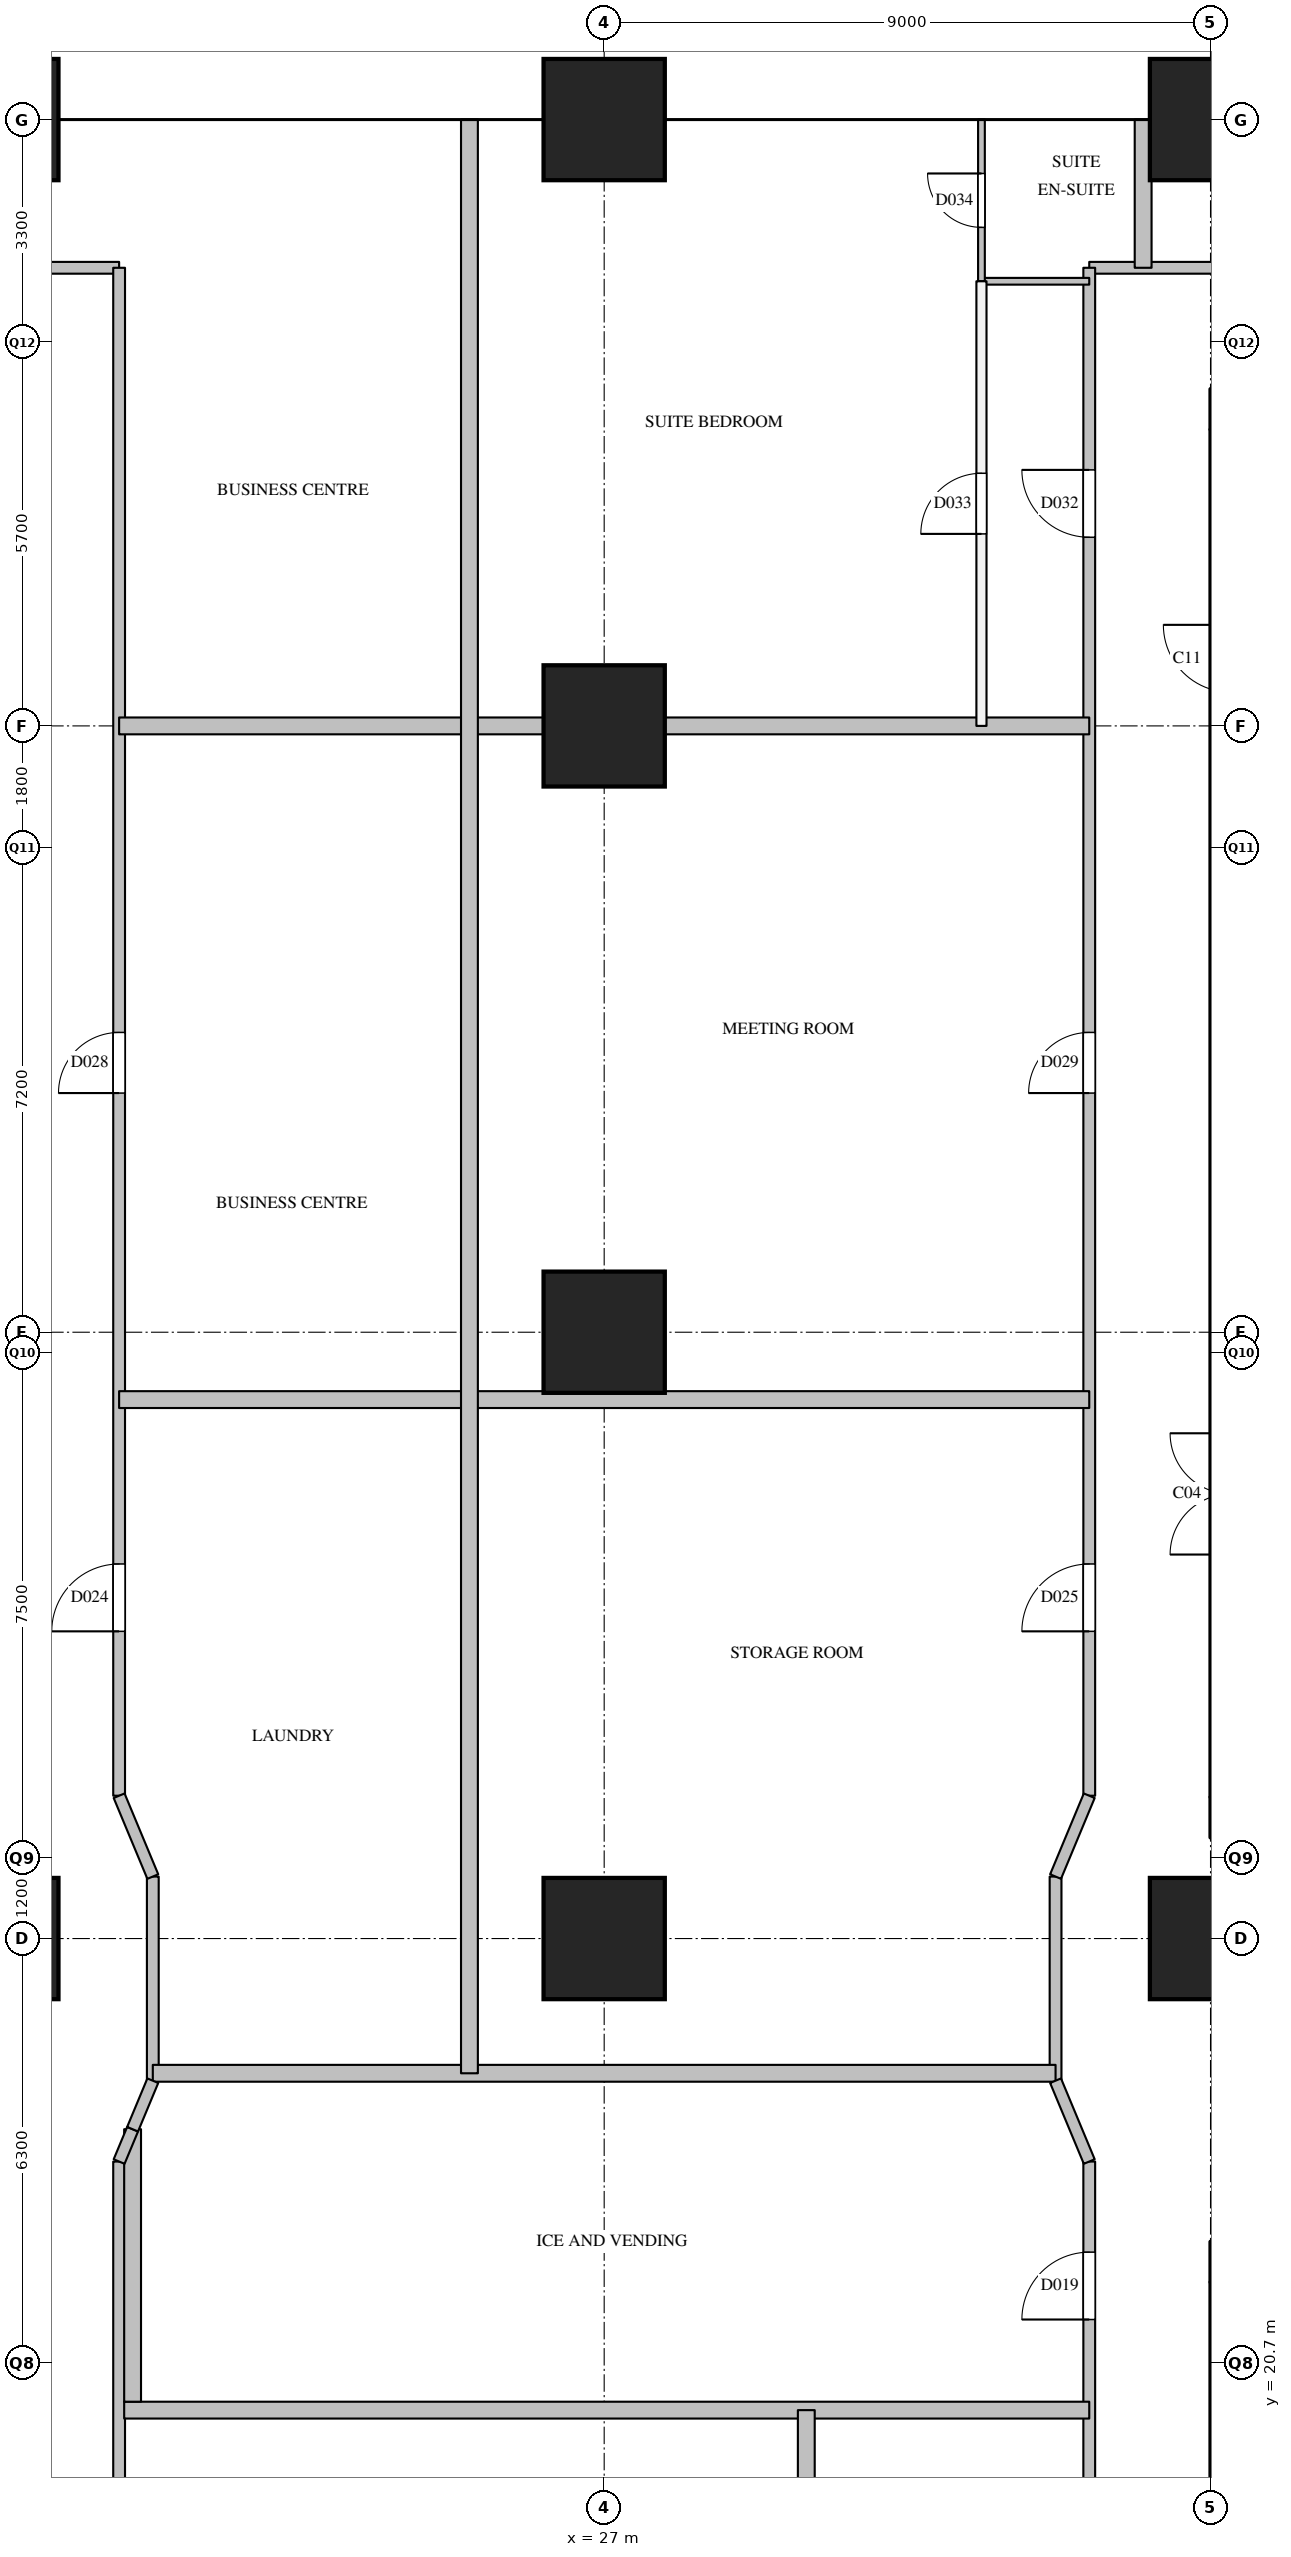
"""IFC4 building model, lengths in metres.
Left out: names, types, materials, properties, quantities, classifications, styles, units other than length and angle.
Written with IfcOpenShell. Run it as: python <this file> out.ifc"""

import sys

from ifc_helpers import new_model, si_unit, direction, frame, frame_2d, origin, origin_2d, place, context, subcontext, project, spatial, rectangle, extrude, element, fill, save


model = new_model("IFC4")
c1 = context("Model", 3, precision=1e-05, world=origin(), true_north=direction((0.0, 1.0)))
c2 = subcontext(c1, "Body", "Model", "MODEL_VIEW")
j1 = project(units=[si_unit("LENGTHUNIT", "METRE"), si_unit("PLANEANGLEUNIT", "RADIAN")], contexts=[c1])
p1 = place(None, origin())
s1 = spatial("IfcSite", under=j1, at=p1, CompositionType="ELEMENT")
p2 = place(p1, origin())
s2 = spatial("IfcBuilding", under=s1, at=p2, CompositionType="ELEMENT")
p3 = place(p2, frame((0.0, 0.0, 42.4)))
s3 = spatial("IfcBuildingStorey", under=s2, at=p3, CompositionType="ELEMENT", Elevation=42.4)
for number, where, z_axis, x_axis in (
    (1, (18.0, 27.0, 0.0), (0.0, 0.0, 1.0), (1.0, 0.0, 0.0)),
    (2, (18.0, 54.0, 0.0), (0.0, 0.0, 1.0), (1.0, 0.0, 0.0)),
    (3, (27.0, 27.0, 0.0), (0.0, 0.0, 1.0), (1.0, 0.0, 0.0)),
    (4, (27.0, 36.0, 0.0), (0.0, 0.0, 1.0), (1.0, 0.0, 0.0)),
    (5, (27.0, 45.0, 0.0), (0.0, 0.0, 1.0), (1.0, 0.0, 0.0)),
    (6, (27.0, 54.0, 0.0), (0.0, 0.0, 1.0), (1.0, 0.0, 0.0)),
    (7, (36.0, 27.0, 0.0), (0.0, 0.0, 1.0), (1.0, 0.0, 0.0)),
    (8, (36.0, 54.0, 0.0), (0.0, 0.0, 1.0), (1.0, 0.0, 0.0)),
):
    element("IfcColumn", number, at=place(p3, frame(where, z_axis=z_axis, x_axis=x_axis)), inside=s3, PredefinedType="COLUMN", context=c2, shape_type="SweptSolid", body=[
        extrude(rectangle(XDim=1.8, YDim=1.8, at=origin_2d()), origin(), (0.0, 0.0, 1.0), 3.8),
    ])
p4 = place(p3, frame((3.8, 51.8, 0.0), z_axis=(0.0, 0.0, 1.0), x_axis=(1.0, 0.0, 0.0)))
e9 = element("IfcWall", 9, at=p4, inside=s3, PredefinedType="PARTITIONING", context=c2, shape_type="SweptSolid", body=[
    extrude(rectangle(XDim=16.0, YDim=0.175, at=frame_2d((8.0, 0.0))), origin(), (0.0, 0.0, 1.0), 3.5),
])
p5 = place(p4, frame((10.65, 0.0, 0.0)))
e10 = element("IfcOpeningElement", 10, at=p5, cuts=e9, PredefinedType="OPENING", context=c2, shape_type="SweptSolid", body=[
    extrude(rectangle(XDim=0.9, YDim=2.1, at=frame_2d((0.45, 1.05))), frame((0.0, 0.097, 0.0), z_axis=(0.0, -1.0, 0.0), x_axis=(1.0, 0.0, 0.0)), (0.0, 0.0, 1.0), 0.195),
])
p6 = place(p3, frame((34.2, 51.8, 0.0), z_axis=(0.0, 0.0, 1.0), x_axis=(1.0, 0.0, 0.0)))
e11 = element("IfcWall", 11, at=p6, inside=s3, PredefinedType="PARTITIONING", context=c2, shape_type="SweptSolid", body=[
    extrude(rectangle(XDim=16.0, YDim=0.175, at=frame_2d((8.0, 0.0))), origin(), (0.0, 0.0, 1.0), 3.5),
])
p7 = place(p6, frame((5.35, 0.0, 0.0)))
e12 = element("IfcOpeningElement", 12, at=p7, cuts=e11, PredefinedType="OPENING", context=c2, shape_type="SweptSolid", body=[
    extrude(rectangle(XDim=0.9, YDim=2.1, at=frame_2d((0.45, 1.05))), frame((0.0, 0.097, 0.0), z_axis=(0.0, -1.0, 0.0), x_axis=(1.0, 0.0, 0.0)), (0.0, 0.0, 1.0), 0.195),
])
p8 = place(p3, frame((19.8, 7.2, 0.0), z_axis=(0.0, 0.0, 1.0), x_axis=(0.0, 1.0, 0.0)))
e13 = element("IfcWall", 13, at=p8, inside=s3, PredefinedType="PARTITIONING", context=c2, shape_type="SweptSolid", body=[
    extrude(rectangle(XDim=16.49, YDim=0.175, at=frame_2d((8.245, 0.0))), origin(), (0.0, 0.0, 1.0), 3.5),
])
p9 = place(p8, frame((7.795, 0.0, 0.0)))
e14 = element("IfcOpeningElement", 14, at=p9, cuts=e13, PredefinedType="OPENING", context=c2, shape_type="SweptSolid", body=[
    extrude(rectangle(XDim=0.9, YDim=2.1, at=frame_2d((0.45, 1.05))), frame((0.0, 0.097, 0.0), z_axis=(0.0, -1.0, 0.0), x_axis=(1.0, 0.0, 0.0)), (0.0, 0.0, 1.0), 0.195),
])
p10 = place(p3, frame((19.8, 29.12, 0.0), z_axis=(0.0, 0.0, 1.0), x_axis=(0.0, 1.0, 0.0)))
e15 = element("IfcWall", 15, at=p10, inside=s3, PredefinedType="PARTITIONING", context=c2, shape_type="SweptSolid", body=[
    extrude(rectangle(XDim=22.68, YDim=0.175, at=frame_2d((11.34, 0.0))), origin(), (0.0, 0.0, 1.0), 3.5),
])
p11 = place(p10, frame((2.44, 0.0, 0.0)))
e16 = element("IfcOpeningElement", 16, at=p11, cuts=e15, PredefinedType="OPENING", context=c2, shape_type="SweptSolid", body=[
    extrude(rectangle(XDim=1.0, YDim=2.1, at=frame_2d((0.5, 1.05))), frame((0.0, 0.097, 0.0), z_axis=(0.0, -1.0, 0.0), x_axis=(1.0, 0.0, 0.0)), (0.0, 0.0, 1.0), 0.195),
])
p12 = place(p10, frame((10.43, 0.0, 0.0)))
e17 = element("IfcOpeningElement", 17, at=p12, cuts=e15, PredefinedType="OPENING", context=c2, shape_type="SweptSolid", body=[
    extrude(rectangle(XDim=0.9, YDim=2.1, at=frame_2d((0.45, 1.05))), frame((0.0, 0.097, 0.0), z_axis=(0.0, -1.0, 0.0), x_axis=(1.0, 0.0, 0.0)), (0.0, 0.0, 1.0), 0.195),
])
for number, where, z_axis, x_axis in (
    (18, (20.3, 24.89, 0.0), (0.0, 0.0, 1.0), (0.0, 1.0, 0.0)),
    (19, (33.7, 24.89, 0.0), (0.0, 0.0, 1.0), (0.0, 1.0, 0.0)),
):
    element("IfcWall", number, at=place(p3, frame(where, z_axis=z_axis, x_axis=x_axis)), inside=s3, PredefinedType="PARTITIONING", context=c2, shape_type="SweptSolid", body=[
        extrude(rectangle(XDim=3.03, YDim=0.175, at=frame_2d((1.515, 0.0))), origin(), (0.0, 0.0, 1.0), 2.5),
    ])
p13 = place(p3, frame((34.2, 7.2, 0.0), z_axis=(0.0, 0.0, 1.0), x_axis=(0.0, 1.0, 0.0)))
e20 = element("IfcWall", 20, at=p13, inside=s3, PredefinedType="PARTITIONING", context=c2, shape_type="SweptSolid", body=[
    extrude(rectangle(XDim=16.49, YDim=0.175, at=frame_2d((8.245, 0.0))), origin(), (0.0, 0.0, 1.0), 3.5),
])
p14 = place(p13, frame((7.3, 0.0, 0.0)))
e21 = element("IfcOpeningElement", 21, at=p14, cuts=e20, PredefinedType="OPENING", context=c2, shape_type="SweptSolid", body=[
    extrude(rectangle(XDim=1.0, YDim=2.1, at=frame_2d((0.5, 1.05))), frame((0.0, 0.097, 0.0), z_axis=(0.0, -1.0, 0.0), x_axis=(1.0, 0.0, 0.0)), (0.0, 0.0, 1.0), 0.195),
])
p15 = place(p13, frame((14.145, 0.0, 0.0)))
e22 = element("IfcOpeningElement", 22, at=p15, cuts=e20, PredefinedType="OPENING", context=c2, shape_type="SweptSolid", body=[
    extrude(rectangle(XDim=1.0, YDim=2.1, at=frame_2d((0.5, 1.05))), frame((0.0, 0.097, 0.0), z_axis=(0.0, -1.0, 0.0), x_axis=(1.0, 0.0, 0.0)), (0.0, 0.0, 1.0), 0.195),
])
p16 = place(p3, frame((34.2, 29.12, 0.0), z_axis=(0.0, 0.0, 1.0), x_axis=(0.0, 1.0, 0.0)))
e23 = element("IfcWall", 23, at=p16, inside=s3, PredefinedType="PARTITIONING", context=c2, shape_type="SweptSolid", body=[
    extrude(rectangle(XDim=22.68, YDim=0.175, at=frame_2d((11.34, 0.0))), origin(), (0.0, 0.0, 1.0), 3.5),
])
p17 = place(p16, frame((2.44, 0.0, 0.0)))
e24 = element("IfcOpeningElement", 24, at=p17, cuts=e23, PredefinedType="OPENING", context=c2, shape_type="SweptSolid", body=[
    extrude(rectangle(XDim=1.0, YDim=2.1, at=frame_2d((0.5, 1.05))), frame((0.0, 0.097, 0.0), z_axis=(0.0, -1.0, 0.0), x_axis=(1.0, 0.0, 0.0)), (0.0, 0.0, 1.0), 0.195),
])
p18 = place(p16, frame((10.43, 0.0, 0.0)))
e25 = element("IfcOpeningElement", 25, at=p18, cuts=e23, PredefinedType="OPENING", context=c2, shape_type="SweptSolid", body=[
    extrude(rectangle(XDim=0.9, YDim=2.1, at=frame_2d((0.45, 1.05))), frame((0.0, 0.097, 0.0), z_axis=(0.0, -1.0, 0.0), x_axis=(1.0, 0.0, 0.0)), (0.0, 0.0, 1.0), 0.195),
])
p19 = place(p16, frame((18.68, 0.0, 0.0)))
e26 = element("IfcOpeningElement", 26, at=p19, cuts=e23, PredefinedType="OPENING", context=c2, shape_type="SweptSolid", body=[
    extrude(rectangle(XDim=1.0, YDim=2.1, at=frame_2d((0.5, 1.05))), frame((0.0, 0.097, 0.0), z_axis=(0.0, -1.0, 0.0), x_axis=(1.0, 0.0, 0.0)), (0.0, 0.0, 1.0), 0.195),
])
p20 = place(p3, frame((32.6, 45.0, 0.0), z_axis=(0.0, 0.0, 1.0), x_axis=(0.0, 1.0, 0.0)))
e27 = element("IfcWall", 27, at=p20, inside=s3, PredefinedType="PARTITIONING", context=c2, shape_type="SweptSolid", body=[
    extrude(rectangle(XDim=6.6, YDim=0.15, at=frame_2d((3.3, 0.0))), origin(), (0.0, 0.0, 1.0), 3.5),
])
p21 = place(p20, frame((2.85, 0.0, 0.0)))
e28 = element("IfcOpeningElement", 28, at=p21, cuts=e27, PredefinedType="OPENING", context=c2, shape_type="SweptSolid", body=[
    extrude(rectangle(XDim=0.9, YDim=2.1, at=frame_2d((0.45, 1.05))), frame((0.0, 0.085, 0.0), z_axis=(0.0, -1.0, 0.0), x_axis=(1.0, 0.0, 0.0)), (0.0, 0.0, 1.0), 0.17),
])
p22 = place(p3, frame((19.875, 20.0, 0.0), z_axis=(0.0, 0.0, 1.0), x_axis=(1.0, 0.0, 0.0)))
e29 = element("IfcWall", 29, at=p22, inside=s3, PredefinedType="PARTITIONING", context=c2, shape_type="SweptSolid", body=[
    extrude(rectangle(XDim=14.325, YDim=0.25, at=frame_2d((7.163, 0.0))), origin(), (0.0, 0.0, 1.0), 2.5),
])
p23 = place(p3, frame((20.3, 25.0, 0.0), z_axis=(0.0, 0.0, 1.0), x_axis=(1.0, 0.0, 0.0)))
e30 = element("IfcWall", 30, at=p23, inside=s3, PredefinedType="PARTITIONING", context=c2, shape_type="SweptSolid", body=[
    extrude(rectangle(XDim=13.4, YDim=0.25, at=frame_2d((6.7, 0.0))), origin(), (0.0, 0.0, 1.0), 2.5),
])
p24 = place(p3, frame((19.8, 35.0, 0.0), z_axis=(0.0, 0.0, 1.0), x_axis=(1.0, 0.0, 0.0)))
e31 = element("IfcWall", 31, at=p24, inside=s3, PredefinedType="PARTITIONING", context=c2, shape_type="SweptSolid", body=[
    extrude(rectangle(XDim=14.4, YDim=0.25, at=frame_2d((7.2, 0.0))), origin(), (0.0, 0.0, 1.0), 2.5),
])
p25 = place(p3, frame((19.8, 45.0, 0.0), z_axis=(0.0, 0.0, 1.0), x_axis=(1.0, 0.0, 0.0)))
e32 = element("IfcWall", 32, at=p25, inside=s3, PredefinedType="PARTITIONING", context=c2, shape_type="SweptSolid", body=[
    extrude(rectangle(XDim=14.4, YDim=0.25, at=frame_2d((7.2, 0.0))), origin(), (0.0, 0.0, 1.0), 3.5),
])
p26 = place(p3, frame((20.0, 20.125, 0.0), z_axis=(0.0, 0.0, 1.0), x_axis=(0.0, 1.0, 0.0)))
e33 = element("IfcWall", 33, at=p26, inside=s3, PredefinedType="PARTITIONING", context=c2, shape_type="SweptSolid", body=[
    extrude(rectangle(XDim=4.045, YDim=0.25, at=frame_2d((2.022, 0.0))), origin(), (0.0, 0.0, 1.0), 3.5),
])
p27 = place(p3, frame((25.0, 25.0, 0.0), z_axis=(0.0, 0.0, 1.0), x_axis=(0.0, 1.0, 0.0)))
e34 = element("IfcWall", 34, at=p27, inside=s3, PredefinedType="PARTITIONING", context=c2, shape_type="SweptSolid", body=[
    extrude(rectangle(XDim=29.0, YDim=0.25, at=frame_2d((14.5, 0.0))), origin(), (0.0, 0.0, 1.0), 2.5),
])
p28 = place(p3, frame((30.0, 0.0, 0.0), z_axis=(0.0, 0.0, 1.0), x_axis=(0.0, 1.0, 0.0)))
e35 = element("IfcWall", 35, at=p28, inside=s3, PredefinedType="PARTITIONING", context=c2, shape_type="SweptSolid", body=[
    extrude(rectangle(XDim=20.0, YDim=0.25, at=frame_2d((10.0, 0.0))), origin(), (0.0, 0.0, 1.0), 2.5),
])
p29 = place(p3, frame((35.0, 51.8, 0.0), z_axis=(0.0, 0.0, 1.0), x_axis=(0.0, 1.0, 0.0)))
e36 = element("IfcWall", 36, at=p29, inside=s3, PredefinedType="PARTITIONING", context=c2, shape_type="SweptSolid", body=[
    extrude(rectangle(XDim=2.2, YDim=0.25, at=frame_2d((1.1, 0.0))), origin(), (0.0, 0.0, 1.0), 2.5),
])
p30 = place(p3, frame((32.6, 51.6, 0.0), z_axis=(0.0, 0.0, 1.0), x_axis=(1.0, 0.0, 0.0)))
e37 = element("IfcWall", 37, at=p30, inside=s3, PredefinedType="PARTITIONING", context=c2, shape_type="SweptSolid", body=[
    extrude(rectangle(XDim=1.6, YDim=0.1, at=frame_2d((0.8, 0.0))), origin(), (0.0, 0.0, 1.0), 3.5),
])
p31 = place(p3, frame((32.6, 51.6, 0.0), z_axis=(0.0, 0.0, 1.0), x_axis=(0.0, 1.0, 0.0)))
e38 = element("IfcWall", 38, at=p31, inside=s3, PredefinedType="PARTITIONING", context=c2, shape_type="SweptSolid", body=[
    extrude(rectangle(XDim=2.4, YDim=0.1, at=frame_2d((1.2, 0.0))), origin(), (0.0, 0.0, 1.0), 2.5),
])
p32 = place(p31, frame((0.8, 0.0, 0.0)))
e39 = element("IfcOpeningElement", 39, at=p32, cuts=e38, PredefinedType="OPENING", context=c2, shape_type="SweptSolid", body=[
    extrude(rectangle(XDim=0.8, YDim=2.1, at=frame_2d((0.4, 1.05))), frame((0.0, 0.06, 0.0), z_axis=(0.0, -1.0, 0.0), x_axis=(1.0, 0.0, 0.0)), (0.0, 0.0, 1.0), 0.12),
])
p33 = place(p3, frame((34.2, 23.69, 0.0), z_axis=(0.0, 0.0, 1.0), x_axis=(-0.384628719983, 0.923071366561, 0.0)))
e40 = element("IfcWall", 40, at=p33, inside=s3, PredefinedType="PARTITIONING", context=c2, shape_type="SweptSolid", body=[
    extrude(rectangle(XDim=1.3, YDim=0.175, at=frame_2d((0.65, 0.0))), origin(), (0.0, 0.0, 1.0), 3.5),
])
p34 = place(p3, frame((33.7, 27.92, 0.0), z_axis=(0.0, 0.0, 1.0), x_axis=(0.384562051588, 0.923099143363, 0.0)))
e41 = element("IfcWall", 41, at=p34, inside=s3, PredefinedType="PARTITIONING", context=c2, shape_type="SweptSolid", body=[
    extrude(rectangle(XDim=1.3, YDim=0.175, at=frame_2d((0.65, 0.0))), origin(), (0.0, 0.0, 1.0), 3.5),
])
p35 = place(p3, frame((20.0, 24.17, 0.0), z_axis=(0.0, 0.0, 1.0), x_axis=(-0.384548704165, -0.923104703771, 0.0)))
e42 = element("IfcWall", 42, at=p35, inside=s3, PredefinedType="PARTITIONING", context=c2, shape_type="SweptSolid", body=[
    extrude(rectangle(XDim=0.52, YDim=0.175, at=frame_2d((0.26, 0.0))), origin(), (0.0, 0.0, 1.0), 3.5),
])
p36 = place(p3, frame((20.3, 24.89, 0.0), z_axis=(0.0, 0.0, 1.0), x_axis=(-0.384682059045, -0.923049139238, 0.0)))
e43 = element("IfcWall", 43, at=p36, inside=s3, PredefinedType="PARTITIONING", context=c2, shape_type="SweptSolid", body=[
    extrude(rectangle(XDim=0.78, YDim=0.175, at=frame_2d((0.39, 0.0))), origin(), (0.0, 0.0, 1.0), 3.5),
])
p37 = place(p3, frame((19.8, 29.12, 0.0), z_axis=(0.0, 0.0, 1.0), x_axis=(0.384562051588, -0.923099143363, 0.0)))
e44 = element("IfcWall", 44, at=p37, inside=s3, PredefinedType="PARTITIONING", context=c2, shape_type="SweptSolid", body=[
    extrude(rectangle(XDim=1.3, YDim=0.175, at=frame_2d((0.65, 0.0))), origin(), (0.0, 0.0, 1.0), 3.5),
])
p38 = place(p15, origin())
e45 = element("IfcDoor", 45, at=p38, inside=s3, OperationType="SINGLE_SWING_LEFT", PredefinedType="DOOR", context=c2, shape_type="SweptSolid", body=[
    extrude(rectangle(XDim=1.0, YDim=2.1, at=frame_2d((0.5, 1.05))), frame((0.0, 0.025, 0.0), z_axis=(0.0, -1.0, 0.0), x_axis=(1.0, 0.0, 0.0)), (0.0, 0.0, 1.0), 0.05),
])
fill(e22, e45)
p39 = place(p11, origin())
e46 = element("IfcDoor", 46, at=p39, inside=s3, OperationType="SINGLE_SWING_LEFT", PredefinedType="DOOR", context=c2, shape_type="SweptSolid", body=[
    extrude(rectangle(XDim=1.0, YDim=2.1, at=frame_2d((0.5, 1.05))), frame((0.0, 0.025, 0.0), z_axis=(0.0, -1.0, 0.0), x_axis=(1.0, 0.0, 0.0)), (0.0, 0.0, 1.0), 0.05),
])
fill(e16, e46)
p40 = place(p17, origin())
e47 = element("IfcDoor", 47, at=p40, inside=s3, OperationType="SINGLE_SWING_LEFT", PredefinedType="DOOR", context=c2, shape_type="SweptSolid", body=[
    extrude(rectangle(XDim=1.0, YDim=2.1, at=frame_2d((0.5, 1.05))), frame((0.0, 0.025, 0.0), z_axis=(0.0, -1.0, 0.0), x_axis=(1.0, 0.0, 0.0)), (0.0, 0.0, 1.0), 0.05),
])
fill(e24, e47)
p41 = place(p12, origin())
e48 = element("IfcDoor", 48, at=p41, inside=s3, OperationType="SINGLE_SWING_LEFT", PredefinedType="DOOR", context=c2, shape_type="SweptSolid", body=[
    extrude(rectangle(XDim=0.9, YDim=2.1, at=frame_2d((0.45, 1.05))), frame((0.0, 0.025, 0.0), z_axis=(0.0, -1.0, 0.0), x_axis=(1.0, 0.0, 0.0)), (0.0, 0.0, 1.0), 0.05),
])
fill(e17, e48)
p42 = place(p18, origin())
e49 = element("IfcDoor", 49, at=p42, inside=s3, OperationType="SINGLE_SWING_LEFT", PredefinedType="DOOR", context=c2, shape_type="SweptSolid", body=[
    extrude(rectangle(XDim=0.9, YDim=2.1, at=frame_2d((0.45, 1.05))), frame((0.0, 0.025, 0.0), z_axis=(0.0, -1.0, 0.0), x_axis=(1.0, 0.0, 0.0)), (0.0, 0.0, 1.0), 0.05),
])
fill(e25, e49)
p43 = place(p19, origin())
e50 = element("IfcDoor", 50, at=p43, inside=s3, OperationType="SINGLE_SWING_RIGHT", PredefinedType="DOOR", context=c2, shape_type="SweptSolid", body=[
    extrude(rectangle(XDim=1.0, YDim=2.1, at=frame_2d((0.5, 1.05))), frame((0.0, 0.025, 0.0), z_axis=(0.0, -1.0, 0.0), x_axis=(1.0, 0.0, 0.0)), (0.0, 0.0, 1.0), 0.05),
])
fill(e26, e50)
p44 = place(p21, origin())
e51 = element("IfcDoor", 51, at=p44, inside=s3, OperationType="SINGLE_SWING_LEFT", PredefinedType="DOOR", context=c2, shape_type="SweptSolid", body=[
    extrude(rectangle(XDim=0.9, YDim=2.1, at=frame_2d((0.45, 1.05))), frame((0.0, 0.025, 0.0), z_axis=(0.0, -1.0, 0.0), x_axis=(1.0, 0.0, 0.0)), (0.0, 0.0, 1.0), 0.05),
])
fill(e28, e51)
p45 = place(p32, origin())
e52 = element("IfcDoor", 52, at=p45, inside=s3, OperationType="SINGLE_SWING_RIGHT", PredefinedType="DOOR", context=c2, shape_type="SweptSolid", body=[
    extrude(rectangle(XDim=0.8, YDim=2.1, at=frame_2d((0.4, 1.05))), frame((0.0, 0.025, 0.0), z_axis=(0.0, -1.0, 0.0), x_axis=(1.0, 0.0, 0.0)), (0.0, 0.0, 1.0), 0.05),
])
fill(e39, e52)
save(model, sys.argv[1])
